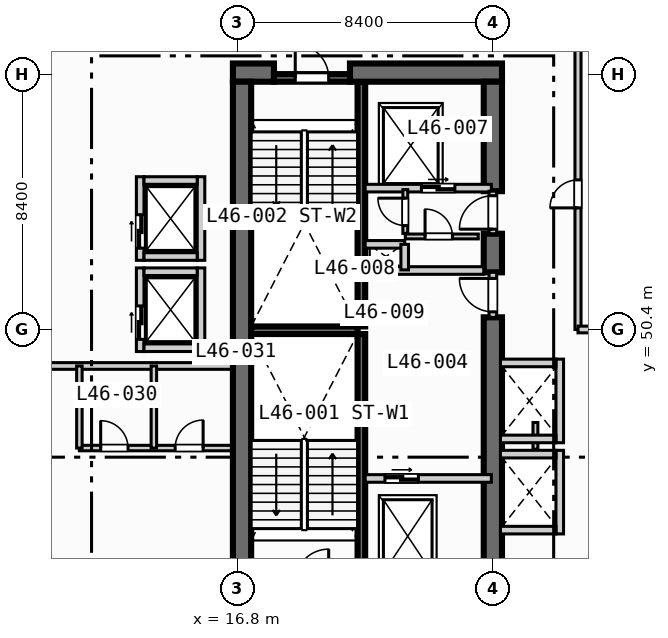
"""IFC4 building model, lengths in metres.
Left out: names, types, materials, properties, quantities, classifications, styles, units other than length and angle.
Written with IfcOpenShell. Run it as: python <this file> out.ifc"""

import sys

from ifc_helpers import new_model, si_unit, direction, frame, frame_2d, origin, place, context, subcontext, project, spatial, rectangle, extrude, element, fill, save


model = new_model("IFC4")
c1 = context("Model", 3, precision=1e-05, world=origin(), true_north=direction((0.0, 1.0)))
c2 = subcontext(c1, "Body", "Model", "MODEL_VIEW")
j1 = project(units=[si_unit("LENGTHUNIT", "METRE"), si_unit("PLANEANGLEUNIT", "RADIAN")], contexts=[c1])
p1 = place(None, origin())
s1 = spatial("IfcSite", under=j1, at=p1, CompositionType="ELEMENT")
p2 = place(p1, origin())
s2 = spatial("IfcBuilding", under=s1, at=p2, CompositionType="ELEMENT")
p3 = place(p2, frame((0.0, 0.0, 190.2)))
s3 = spatial("IfcBuildingStorey", under=s2, at=p3, CompositionType="ELEMENT", Elevation=190.2)
for number, where, z_axis, x_axis in (
    (1, (20.875, 42.2, 0.0), (0.0, 0.0, 1.0), (0.0, 1.0, 0.0)),
    (2, (20.875, 50.5, 0.0), (0.0, 0.0, 1.0), (0.0, 1.0, 0.0)),
):
    element("IfcWall", number, at=place(p3, frame(where, z_axis=z_axis, x_axis=x_axis)), inside=s3, PredefinedType="SOLIDWALL", context=c2, shape_type="SweptSolid", body=[
        extrude(rectangle(XDim=8.05, YDim=0.25, at=frame_2d((4.025, 0.0))), origin(), (0.0, 0.0, 1.0), 3.47),
    ])
p4 = place(p3, frame((17.25, 50.375, 0.0), z_axis=(0.0, 0.0, 1.0), x_axis=(1.0, 0.0, 0.0)))
e3 = element("IfcWall", 3, at=p4, inside=s3, PredefinedType="SOLIDWALL", context=c2, shape_type="SweptSolid", body=[
    extrude(rectangle(XDim=3.5, YDim=0.25, at=frame_2d((1.75, 0.0))), origin(), (0.0, 0.0, 1.0), 3.47),
])
p5 = place(p3, frame((16.65, 58.85, 0.0), z_axis=(0.0, 0.0, 1.0), x_axis=(1.0, 0.0, 0.0)))
e4 = element("IfcWall", 4, at=p5, inside=s3, PredefinedType="SHEAR", context=c2, shape_type="SweptSolid", body=[
    extrude(rectangle(XDim=1.35, YDim=0.6, at=frame_2d((0.675, 0.0))), origin(), (0.0, 0.0, 1.0), 3.47),
])
p6 = place(p3, frame((20.5, 58.85, 0.0), z_axis=(0.0, 0.0, 1.0), x_axis=(1.0, 0.0, 0.0)))
e5 = element("IfcWall", 5, at=p6, inside=s3, PredefinedType="SHEAR", context=c2, shape_type="SweptSolid", body=[
    extrude(rectangle(XDim=5.0, YDim=0.6, at=frame_2d((2.5, 0.0))), origin(), (0.0, 0.0, 1.0), 3.47),
])
p7 = place(p3, frame((16.95, 42.2, 0.0), z_axis=(0.0, 0.0, 1.0), x_axis=(0.0, 1.0, 0.0)))
e6 = element("IfcWall", 6, at=p7, inside=s3, PredefinedType="SHEAR", context=c2, shape_type="SweptSolid", body=[
    extrude(rectangle(XDim=16.35, YDim=0.6, at=frame_2d((8.175, 0.0))), origin(), (0.0, 0.0, 1.0), 3.47),
])
p8 = place(p3, frame((25.2, 42.2, 0.0), z_axis=(0.0, 0.0, 1.0), x_axis=(0.0, 1.0, 0.0)))
e7 = element("IfcWall", 7, at=p8, inside=s3, PredefinedType="SHEAR", context=c2, shape_type="SweptSolid", body=[
    extrude(rectangle(XDim=8.6, YDim=0.6, at=frame_2d((4.3, 0.0))), origin(), (0.0, 0.0, 1.0), 3.47),
])
p9 = place(p3, frame((25.2, 52.28, 0.0), z_axis=(0.0, 0.0, 1.0), x_axis=(0.0, 1.0, 0.0)))
e8 = element("IfcWall", 8, at=p9, inside=s3, PredefinedType="SHEAR", context=c2, shape_type="SweptSolid", body=[
    extrude(rectangle(XDim=1.27, YDim=0.6, at=frame_2d((0.635, 0.0))), origin(), (0.0, 0.0, 1.0), 3.47),
])
p10 = place(p3, frame((25.2, 54.95, 0.0), z_axis=(0.0, 0.0, 1.0), x_axis=(0.0, 1.0, 0.0)))
e9 = element("IfcWall", 9, at=p10, inside=s3, PredefinedType="SHEAR", context=c2, shape_type="SweptSolid", body=[
    extrude(rectangle(XDim=3.6, YDim=0.6, at=frame_2d((1.8, 0.0))), origin(), (0.0, 0.0, 1.0), 3.47),
])
p11 = place(p3, frame((18.0, 58.675, 0.0), z_axis=(0.0, 0.0, 1.0), x_axis=(1.0, 0.0, 0.0)))
e10 = element("IfcWall", 10, at=p11, inside=s3, PredefinedType="SOLIDWALL", context=c2, shape_type="SweptSolid", body=[
    extrude(rectangle(XDim=2.5, YDim=0.25, at=frame_2d((1.25, 0.0))), origin(), (0.0, 0.0, 1.0), 3.47),
])
p12 = place(p11, frame((0.7, 0.0, 0.0)))
e11 = element("IfcOpeningElement", 11, at=p12, cuts=e10, PredefinedType="OPENING", context=c2, shape_type="SweptSolid", body=[
    extrude(rectangle(XDim=1.1, YDim=2.15, at=frame_2d((0.55, 1.075))), frame((0.0, 0.135, 0.0), z_axis=(0.0, -1.0, 0.0), x_axis=(1.0, 0.0, 0.0)), (0.0, 0.0, 1.0), 0.27),
])
p13 = place(p3, frame((21.0, 45.5, 0.0), z_axis=(0.0, 0.0, 1.0), x_axis=(1.0, 0.0, 0.0)))
e12 = element("IfcWall", 12, at=p13, inside=s3, PredefinedType="SOLIDWALL", context=c2, shape_type="SweptSolid", body=[
    extrude(rectangle(XDim=4.15, YDim=0.25, at=frame_2d((2.075, 0.0))), origin(), (0.0, 0.0, 1.0), 3.47),
])
p14 = place(p13, frame((0.65, 0.0, 0.0)))
e13 = element("IfcOpeningElement", 13, at=p14, cuts=e12, PredefinedType="OPENING", context=c2, shape_type="SweptSolid", body=[
    extrude(rectangle(XDim=1.1, YDim=2.15, at=frame_2d((0.55, 1.075))), frame((0.0, 0.135, 0.0), z_axis=(0.0, -1.0, 0.0), x_axis=(1.0, 0.0, 0.0)), (0.0, 0.0, 1.0), 0.27),
])
p15 = place(p3, frame((25.2, 50.8, 0.0), z_axis=(0.0, 0.0, 1.0), x_axis=(0.0, 1.0, 0.0)))
e14 = element("IfcWall", 14, at=p15, inside=s3, PredefinedType="SOLIDWALL", context=c2, shape_type="SweptSolid", body=[
    extrude(rectangle(XDim=1.48, YDim=0.25, at=frame_2d((0.74, 0.0))), origin(), (0.0, 0.0, 1.0), 3.47),
])
p16 = place(p15, frame((0.18, 0.0, 0.0)))
e15 = element("IfcOpeningElement", 15, at=p16, cuts=e14, PredefinedType="OPENING", context=c2, shape_type="SweptSolid", body=[
    extrude(rectangle(XDim=1.1, YDim=2.15, at=frame_2d((0.55, 1.075))), frame((0.0, 0.135, 0.0), z_axis=(0.0, -1.0, 0.0), x_axis=(1.0, 0.0, 0.0)), (0.0, 0.0, 1.0), 0.27),
])
p17 = place(p3, frame((21.0, 52.34, 0.0), z_axis=(0.0, 0.0, 1.0), x_axis=(1.0, 0.0, 0.0)))
e16 = element("IfcWall", 16, at=p17, inside=s3, PredefinedType="SOLIDWALL", context=c2, shape_type="SweptSolid", body=[
    extrude(rectangle(XDim=3.9, YDim=0.25, at=frame_2d((1.95, 0.0))), origin(), (0.0, 0.0, 1.0), 3.47),
])
p18 = place(p3, frame((21.0, 55.05, 0.0), z_axis=(0.0, 0.0, 1.0), x_axis=(1.0, 0.0, 0.0)))
e17 = element("IfcWall", 17, at=p18, inside=s3, PredefinedType="SOLIDWALL", context=c2, shape_type="SweptSolid", body=[
    extrude(rectangle(XDim=4.15, YDim=0.25, at=frame_2d((2.075, 0.0))), origin(), (0.0, 0.0, 1.0), 3.47),
])
p19 = place(p18, frame((1.85, 0.0, 0.0)))
e18 = element("IfcOpeningElement", 18, at=p19, cuts=e17, PredefinedType="OPENING", context=c2, shape_type="SweptSolid", body=[
    extrude(rectangle(XDim=1.1, YDim=2.15, at=frame_2d((0.55, 1.075))), frame((0.0, 0.135, 0.0), z_axis=(0.0, -1.0, 0.0), x_axis=(1.0, 0.0, 0.0)), (0.0, 0.0, 1.0), 0.27),
])
p20 = place(p3, frame((25.2, 53.55, 0.0), z_axis=(0.0, 0.0, 1.0), x_axis=(0.0, 1.0, 0.0)))
e19 = element("IfcWall", 19, at=p20, inside=s3, PredefinedType="SOLIDWALL", context=c2, shape_type="SweptSolid", body=[
    extrude(rectangle(XDim=1.4, YDim=0.25, at=frame_2d((0.7, 0.0))), origin(), (0.0, 0.0, 1.0), 3.47),
])
p21 = place(p20, frame((0.15, 0.0, 0.0)))
e20 = element("IfcOpeningElement", 20, at=p21, cuts=e19, PredefinedType="OPENING", context=c2, shape_type="SweptSolid", body=[
    extrude(rectangle(XDim=1.1, YDim=2.15, at=frame_2d((0.55, 1.075))), frame((0.0, 0.135, 0.0), z_axis=(0.0, -1.0, 0.0), x_axis=(1.0, 0.0, 0.0)), (0.0, 0.0, 1.0), 0.27),
])
p22 = place(p3, frame((21.0, 53.2, 0.0), z_axis=(0.0, 0.0, 1.0), x_axis=(1.0, 0.0, 0.0)))
e21 = element("IfcWall", 21, at=p22, inside=s3, PredefinedType="SOLIDWALL", context=c2, shape_type="SweptSolid", body=[
    extrude(rectangle(XDim=1.3, YDim=0.25, at=frame_2d((0.65, 0.0))), origin(), (0.0, 0.0, 1.0), 3.47),
])
p23 = place(p3, frame((22.3, 52.36, 0.0), z_axis=(0.0, 0.0, 1.0), x_axis=(0.0, 1.0, 0.0)))
e22 = element("IfcWall", 22, at=p23, inside=s3, PredefinedType="SOLIDWALL", context=c2, shape_type="SweptSolid", body=[
    extrude(rectangle(XDim=0.84, YDim=0.25, at=frame_2d((0.42, 0.0))), origin(), (0.0, 0.0, 1.0), 3.47),
])
p24 = place(p3, frame((22.32, 53.56, 0.0), z_axis=(0.0, 0.0, 1.0), x_axis=(0.0, 1.0, 0.0)))
e23 = element("IfcWall", 23, at=p24, inside=s3, PredefinedType="PARTITIONING", context=c2, shape_type="SweptSolid", body=[
    extrude(rectangle(XDim=1.44, YDim=0.16, at=frame_2d((0.72, 0.0))), origin(), (0.0, 0.0, 1.0), 3.47),
])
p25 = place(p24, frame((0.26, 0.0, 0.0)))
e24 = element("IfcOpeningElement", 24, at=p25, cuts=e23, PredefinedType="OPENING", context=c2, shape_type="SweptSolid", body=[
    extrude(rectangle(XDim=0.9, YDim=2.1, at=frame_2d((0.45, 1.05))), frame((0.0, 0.09, 0.0), z_axis=(0.0, -1.0, 0.0), x_axis=(1.0, 0.0, 0.0)), (0.0, 0.0, 1.0), 0.18),
])
p26 = place(p3, frame((22.32, 53.46, 0.0), z_axis=(0.0, 0.0, 1.0), x_axis=(1.0, 0.0, 0.0)))
e25 = element("IfcWall", 25, at=p26, inside=s3, PredefinedType="PARTITIONING", context=c2, shape_type="SweptSolid", body=[
    extrude(rectangle(XDim=2.4, YDim=0.16, at=frame_2d((1.2, 0.0))), origin(), (0.0, 0.0, 1.0), 3.47),
])
p27 = place(p26, frame((0.65, 0.0, 0.0)))
e26 = element("IfcOpeningElement", 26, at=p27, cuts=e25, PredefinedType="OPENING", context=c2, shape_type="SweptSolid", body=[
    extrude(rectangle(XDim=0.9, YDim=2.1, at=frame_2d((0.45, 1.05))), frame((0.0, 0.09, 0.0), z_axis=(0.0, -1.0, 0.0), x_axis=(1.0, 0.0, 0.0)), (0.0, 0.0, 1.0), 0.18),
])
p28 = place(p3, frame((13.6, 49.675, 0.0), z_axis=(0.0, 0.0, 1.0), x_axis=(0.0, 1.0, 0.0)))
e27 = element("IfcWall", 27, at=p28, inside=s3, PredefinedType="SOLIDWALL", context=c2, shape_type="SweptSolid", body=[
    extrude(rectangle(XDim=2.75, YDim=0.25, at=frame_2d((1.375, 0.0))), origin(), (0.0, 0.0, 1.0), 3.47),
])
p29 = place(p28, frame((0.4, 0.0, 0.0)))
e28 = element("IfcOpeningElement", 28, at=p29, cuts=e27, PredefinedType="OPENING", context=c2, shape_type="SweptSolid", body=[
    extrude(rectangle(XDim=1.1, YDim=2.15, at=frame_2d((0.55, 1.075))), frame((0.0, 0.135, 0.0), z_axis=(0.0, -1.0, 0.0), x_axis=(1.0, 0.0, 0.0)), (0.0, 0.0, 1.0), 0.27),
])
p30 = place(p3, frame((15.6, 49.675, 0.0), z_axis=(0.0, 0.0, 1.0), x_axis=(0.0, 1.0, 0.0)))
e29 = element("IfcWall", 29, at=p30, inside=s3, PredefinedType="SOLIDWALL", context=c2, shape_type="SweptSolid", body=[
    extrude(rectangle(XDim=2.75, YDim=0.25, at=frame_2d((1.375, 0.0))), origin(), (0.0, 0.0, 1.0), 3.47),
])
for number, where, z_axis, x_axis in (
    (30, (13.725, 49.8, 0.0), (0.0, 0.0, 1.0), (1.0, 0.0, 0.0)),
    (31, (13.725, 52.3, 0.0), (0.0, 0.0, 1.0), (1.0, 0.0, 0.0)),
):
    element("IfcWall", number, at=place(p3, frame(where, z_axis=z_axis, x_axis=x_axis)), inside=s3, PredefinedType="SOLIDWALL", context=c2, shape_type="SweptSolid", body=[
        extrude(rectangle(XDim=1.75, YDim=0.25, at=frame_2d((0.875, 0.0))), origin(), (0.0, 0.0, 1.0), 3.47),
    ])
p31 = place(p3, frame((13.6, 52.675, 0.0), z_axis=(0.0, 0.0, 1.0), x_axis=(0.0, 1.0, 0.0)))
e32 = element("IfcWall", 32, at=p31, inside=s3, PredefinedType="SOLIDWALL", context=c2, shape_type="SweptSolid", body=[
    extrude(rectangle(XDim=2.75, YDim=0.25, at=frame_2d((1.375, 0.0))), origin(), (0.0, 0.0, 1.0), 3.47),
])
p32 = place(p31, frame((0.4, 0.0, 0.0)))
e33 = element("IfcOpeningElement", 33, at=p32, cuts=e32, PredefinedType="OPENING", context=c2, shape_type="SweptSolid", body=[
    extrude(rectangle(XDim=1.1, YDim=2.15, at=frame_2d((0.55, 1.075))), frame((0.0, 0.135, 0.0), z_axis=(0.0, -1.0, 0.0), x_axis=(1.0, 0.0, 0.0)), (0.0, 0.0, 1.0), 0.27),
])
p33 = place(p3, frame((15.6, 52.675, 0.0), z_axis=(0.0, 0.0, 1.0), x_axis=(0.0, 1.0, 0.0)))
e34 = element("IfcWall", 34, at=p33, inside=s3, PredefinedType="SOLIDWALL", context=c2, shape_type="SweptSolid", body=[
    extrude(rectangle(XDim=2.75, YDim=0.25, at=frame_2d((1.375, 0.0))), origin(), (0.0, 0.0, 1.0), 3.47),
])
for number, where, z_axis, x_axis in (
    (35, (13.725, 52.8, 0.0), (0.0, 0.0, 1.0), (1.0, 0.0, 0.0)),
    (36, (13.725, 55.3, 0.0), (0.0, 0.0, 1.0), (1.0, 0.0, 0.0)),
):
    element("IfcWall", number, at=place(p3, frame(where, z_axis=z_axis, x_axis=x_axis)), inside=s3, PredefinedType="SOLIDWALL", context=c2, shape_type="SweptSolid", body=[
        extrude(rectangle(XDim=1.75, YDim=0.25, at=frame_2d((0.875, 0.0))), origin(), (0.0, 0.0, 1.0), 3.47),
    ])
p34 = place(p3, frame((27.4, 43.675, 0.0), z_axis=(0.0, 0.0, 1.0), x_axis=(0.0, 1.0, 0.0)))
e37 = element("IfcWall", 37, at=p34, inside=s3, PredefinedType="SOLIDWALL", context=c2, shape_type="SweptSolid", body=[
    extrude(rectangle(XDim=2.75, YDim=0.25, at=frame_2d((1.375, 0.0))), origin(), (0.0, 0.0, 1.0), 3.47),
])
for number, where, z_axis, x_axis in (
    (38, (25.45, 43.8, 0.0), (0.0, 0.0, 1.0), (1.0, 0.0, 0.0)),
    (39, (25.45, 46.3, 0.0), (0.0, 0.0, 1.0), (1.0, 0.0, 0.0)),
):
    element("IfcWall", number, at=place(p3, frame(where, z_axis=z_axis, x_axis=x_axis)), inside=s3, PredefinedType="SOLIDWALL", context=c2, shape_type="SweptSolid", body=[
        extrude(rectangle(XDim=1.825, YDim=0.25, at=frame_2d((0.913, 0.0))), origin(), (0.0, 0.0, 1.0), 3.47),
    ])
p35 = place(p3, frame((26.6, 46.46, 0.0), z_axis=(0.0, 0.0, 1.0), x_axis=(0.0, 1.0, 0.0)))
e40 = element("IfcWall", 40, at=p35, inside=s3, PredefinedType="PARTITIONING", context=c2, shape_type="SweptSolid", body=[
    extrude(rectangle(XDim=0.88, YDim=0.16, at=frame_2d((0.44, 0.0))), origin(), (0.0, 0.0, 1.0), 3.47),
])
p36 = place(p3, frame((27.4, 46.675, 0.0), z_axis=(0.0, 0.0, 1.0), x_axis=(0.0, 1.0, 0.0)))
e41 = element("IfcWall", 41, at=p36, inside=s3, PredefinedType="SOLIDWALL", context=c2, shape_type="SweptSolid", body=[
    extrude(rectangle(XDim=2.75, YDim=0.25, at=frame_2d((1.375, 0.0))), origin(), (0.0, 0.0, 1.0), 3.47),
])
for number, where, z_axis, x_axis in (
    (42, (25.45, 46.8, 0.0), (0.0, 0.0, 1.0), (1.0, 0.0, 0.0)),
    (43, (25.45, 49.3, 0.0), (0.0, 0.0, 1.0), (1.0, 0.0, 0.0)),
):
    element("IfcWall", number, at=place(p3, frame(where, z_axis=z_axis, x_axis=x_axis)), inside=s3, PredefinedType="SOLIDWALL", context=c2, shape_type="SweptSolid", body=[
        extrude(rectangle(XDim=1.825, YDim=0.25, at=frame_2d((0.913, 0.0))), origin(), (0.0, 0.0, 1.0), 3.47),
    ])
p37 = place(p3, frame((0.35, 49.2, 0.0), z_axis=(0.0, 0.0, 1.0), x_axis=(1.0, 0.0, 0.0)))
e44 = element("IfcWall", 44, at=p37, inside=s3, PredefinedType="PARTITIONING", context=c2, shape_type="SweptSolid", body=[
    extrude(rectangle(XDim=16.25, YDim=0.22, at=frame_2d((8.125, 0.0))), origin(), (0.0, 0.0, 1.0), 3.47),
])
p38 = place(p3, frame((11.6, 46.5, 0.0), z_axis=(0.0, 0.0, 1.0), x_axis=(1.0, 0.0, 0.0)))
e45 = element("IfcWall", 45, at=p38, inside=s3, PredefinedType="PLUMBINGWALL", context=c2, shape_type="SweptSolid", body=[
    extrude(rectangle(XDim=5.0, YDim=0.18, at=frame_2d((2.5, 0.0))), origin(), (0.0, 0.0, 1.0), 3.47),
])
p39 = place(p38, frame((0.7, 0.0, 0.0)))
e46 = element("IfcOpeningElement", 46, at=p39, cuts=e45, PredefinedType="OPENING", context=c2, shape_type="SweptSolid", body=[
    extrude(rectangle(XDim=0.9, YDim=2.1, at=frame_2d((0.45, 1.05))), frame((0.0, 0.1, 0.0), z_axis=(0.0, -1.0, 0.0), x_axis=(1.0, 0.0, 0.0)), (0.0, 0.0, 1.0), 0.2),
])
p40 = place(p38, frame((3.15, 0.0, 0.0)))
e47 = element("IfcOpeningElement", 47, at=p40, cuts=e45, PredefinedType="OPENING", context=c2, shape_type="SweptSolid", body=[
    extrude(rectangle(XDim=0.92, YDim=2.1, at=frame_2d((0.46, 1.05))), frame((0.0, 0.1, 0.0), z_axis=(0.0, -1.0, 0.0), x_axis=(1.0, 0.0, 0.0)), (0.0, 0.0, 1.0), 0.2),
])
for number, where, z_axis, x_axis in (
    (48, (11.6, 46.5, 0.0), (0.0, 0.0, 1.0), (0.0, 1.0, 0.0)),
    (49, (14.05, 46.5, 0.0), (0.0, 0.0, 1.0), (0.0, 1.0, 0.0)),
):
    element("IfcWall", number, at=place(p3, frame(where, z_axis=z_axis, x_axis=x_axis)), inside=s3, PredefinedType="PLUMBINGWALL", context=c2, shape_type="SweptSolid", body=[
        extrude(rectangle(XDim=2.7, YDim=0.18, at=frame_2d((1.35, 0.0))), origin(), (0.0, 0.0, 1.0), 3.47),
    ])
p41 = place(p3, frame((28.0, 50.4, 0.0), z_axis=(0.0, 0.0, 1.0), x_axis=(0.0, 1.0, 0.0)))
e50 = element("IfcWall", 50, at=p41, inside=s3, PredefinedType="PARTITIONING", context=c2, shape_type="SweptSolid", body=[
    extrude(rectangle(XDim=21.8, YDim=0.2, at=frame_2d((10.9, 0.0))), origin(), (0.0, 0.0, 1.0), 3.47),
])
p42 = place(p41, frame((4.0, 0.0, 0.0)))
e51 = element("IfcOpeningElement", 51, at=p42, cuts=e50, PredefinedType="OPENING", context=c2, shape_type="SweptSolid", body=[
    extrude(rectangle(XDim=0.92, YDim=2.1, at=frame_2d((0.46, 1.05))), frame((0.0, 0.11, 0.0), z_axis=(0.0, -1.0, 0.0), x_axis=(1.0, 0.0, 0.0)), (0.0, 0.0, 1.0), 0.22),
])
p43 = place(p3, frame((28.0, 50.4, 0.0), z_axis=(0.0, 0.0, 1.0), x_axis=(1.0, 0.0, 0.0)))
e52 = element("IfcWall", 52, at=p43, inside=s3, PredefinedType="PARTITIONING", context=c2, shape_type="SweptSolid", body=[
    extrude(rectangle(XDim=5.3, YDim=0.22, at=frame_2d((2.65, 0.0))), origin(), (0.0, 0.0, 1.0), 3.16),
])
p44 = place(p12, origin())
e53 = element("IfcDoor", 53, at=p44, inside=s3, OperationType="SINGLE_SWING_LEFT", PredefinedType="DOOR", context=c2, shape_type="SweptSolid", body=[
    extrude(rectangle(XDim=1.1, YDim=2.15, at=frame_2d((0.55, 1.075))), frame((0.0, 0.025, 0.0), z_axis=(0.0, -1.0, 0.0), x_axis=(1.0, 0.0, 0.0)), (0.0, 0.0, 1.0), 0.05),
])
fill(e11, e53)
p45 = place(p14, origin())
e54 = element("IfcDoor", 54, at=p45, inside=s3, OperationType="SLIDING_TO_LEFT", PredefinedType="DOOR", context=c2, shape_type="SweptSolid", body=[
    extrude(rectangle(XDim=1.1, YDim=2.15, at=frame_2d((0.55, 1.075))), frame((0.0, 0.025, 0.0), z_axis=(0.0, -1.0, 0.0), x_axis=(1.0, 0.0, 0.0)), (0.0, 0.0, 1.0), 0.05),
])
fill(e13, e54)
p46 = place(p16, origin())
e55 = element("IfcDoor", 55, at=p46, inside=s3, OperationType="SINGLE_SWING_RIGHT", PredefinedType="DOOR", context=c2, shape_type="SweptSolid", body=[
    extrude(rectangle(XDim=1.1, YDim=2.15, at=frame_2d((0.55, 1.075))), frame((0.0, 0.025, 0.0), z_axis=(0.0, -1.0, 0.0), x_axis=(1.0, 0.0, 0.0)), (0.0, 0.0, 1.0), 0.05),
])
fill(e15, e55)
p47 = place(p19, origin())
e56 = element("IfcDoor", 56, at=p47, inside=s3, OperationType="SLIDING_TO_LEFT", PredefinedType="DOOR", context=c2, shape_type="SweptSolid", body=[
    extrude(rectangle(XDim=1.1, YDim=2.15, at=frame_2d((0.55, 1.075))), frame((0.0, 0.025, 0.0), z_axis=(0.0, -1.0, 0.0), x_axis=(1.0, 0.0, 0.0)), (0.0, 0.0, 1.0), 0.05),
])
fill(e18, e56)
p48 = place(p21, origin())
e57 = element("IfcDoor", 57, at=p48, inside=s3, OperationType="SINGLE_SWING_LEFT", PredefinedType="DOOR", context=c2, shape_type="SweptSolid", body=[
    extrude(rectangle(XDim=1.1, YDim=2.15, at=frame_2d((0.55, 1.075))), frame((0.0, 0.025, 0.0), z_axis=(0.0, -1.0, 0.0), x_axis=(1.0, 0.0, 0.0)), (0.0, 0.0, 1.0), 0.05),
])
fill(e20, e57)
p49 = place(p25, origin())
e58 = element("IfcDoor", 58, at=p49, inside=s3, OperationType="SINGLE_SWING_RIGHT", PredefinedType="DOOR", context=c2, shape_type="SweptSolid", body=[
    extrude(rectangle(XDim=0.9, YDim=2.1, at=frame_2d((0.45, 1.05))), frame((0.0, 0.025, 0.0), z_axis=(0.0, -1.0, 0.0), x_axis=(1.0, 0.0, 0.0)), (0.0, 0.0, 1.0), 0.05),
])
fill(e24, e58)
p50 = place(p27, origin())
e59 = element("IfcDoor", 59, at=p50, inside=s3, OperationType="SINGLE_SWING_LEFT", PredefinedType="DOOR", context=c2, shape_type="SweptSolid", body=[
    extrude(rectangle(XDim=0.9, YDim=2.1, at=frame_2d((0.45, 1.05))), frame((0.0, 0.025, 0.0), z_axis=(0.0, -1.0, 0.0), x_axis=(1.0, 0.0, 0.0)), (0.0, 0.0, 1.0), 0.05),
])
fill(e26, e59)
p51 = place(p29, origin())
e60 = element("IfcDoor", 60, at=p51, inside=s3, OperationType="SLIDING_TO_LEFT", PredefinedType="DOOR", context=c2, shape_type="SweptSolid", body=[
    extrude(rectangle(XDim=1.1, YDim=2.15, at=frame_2d((0.55, 1.075))), frame((0.0, 0.025, 0.0), z_axis=(0.0, -1.0, 0.0), x_axis=(1.0, 0.0, 0.0)), (0.0, 0.0, 1.0), 0.05),
])
fill(e28, e60)
p52 = place(p32, origin())
e61 = element("IfcDoor", 61, at=p52, inside=s3, OperationType="SLIDING_TO_LEFT", PredefinedType="DOOR", context=c2, shape_type="SweptSolid", body=[
    extrude(rectangle(XDim=1.1, YDim=2.15, at=frame_2d((0.55, 1.075))), frame((0.0, 0.025, 0.0), z_axis=(0.0, -1.0, 0.0), x_axis=(1.0, 0.0, 0.0)), (0.0, 0.0, 1.0), 0.05),
])
fill(e33, e61)
p53 = place(p39, origin())
e62 = element("IfcDoor", 62, at=p53, inside=s3, OperationType="SINGLE_SWING_LEFT", PredefinedType="DOOR", context=c2, shape_type="SweptSolid", body=[
    extrude(rectangle(XDim=0.9, YDim=2.1, at=frame_2d((0.45, 1.05))), frame((0.0, 0.025, 0.0), z_axis=(0.0, -1.0, 0.0), x_axis=(1.0, 0.0, 0.0)), (0.0, 0.0, 1.0), 0.05),
])
fill(e46, e62)
p54 = place(p40, origin())
e63 = element("IfcDoor", 63, at=p54, inside=s3, OperationType="SINGLE_SWING_RIGHT", PredefinedType="DOOR", context=c2, shape_type="SweptSolid", body=[
    extrude(rectangle(XDim=0.92, YDim=2.1, at=frame_2d((0.46, 1.05))), frame((0.0, 0.025, 0.0), z_axis=(0.0, -1.0, 0.0), x_axis=(1.0, 0.0, 0.0)), (0.0, 0.0, 1.0), 0.05),
])
fill(e47, e63)
p55 = place(p42, origin())
e64 = element("IfcDoor", 64, at=p55, inside=s3, OperationType="SINGLE_SWING_LEFT", PredefinedType="DOOR", context=c2, shape_type="SweptSolid", body=[
    extrude(rectangle(XDim=0.92, YDim=2.1, at=frame_2d((0.46, 1.05))), frame((0.0, 0.025, 0.0), z_axis=(0.0, -1.0, 0.0), x_axis=(1.0, 0.0, 0.0)), (0.0, 0.0, 1.0), 0.05),
])
fill(e51, e64)
save(model, sys.argv[1])
